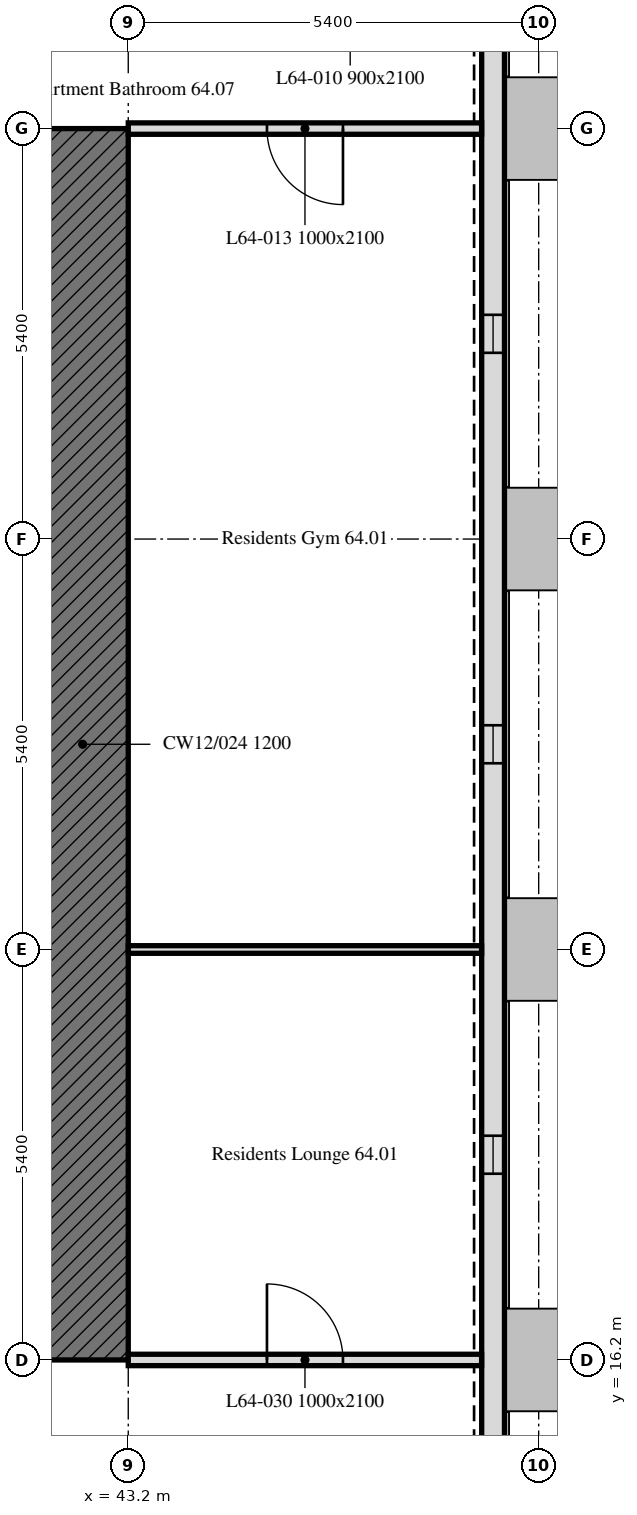
"""IFC4 building model, lengths in metres.
Left out: names, types, materials, properties, quantities, classifications, styles, units other than length and angle.
Written with IfcOpenShell. Run it as: python <this file> out.ifc"""

import sys

from ifc_helpers import new_model, si_unit, direction, frame, frame_2d, origin, place, context, subcontext, project, spatial, rectangle, extrude, element, fill, save


model = new_model("IFC4")
c1 = context("Model", 3, precision=1e-05, world=origin(), true_north=direction((0.0, 1.0)))
c2 = subcontext(c1, "Body", "Model", "MODEL_VIEW")
j1 = project(units=[si_unit("LENGTHUNIT", "METRE"), si_unit("PLANEANGLEUNIT", "RADIAN")], contexts=[c1])
p1 = place(None, origin())
s1 = spatial("IfcSite", under=j1, at=p1, CompositionType="ELEMENT")
p2 = place(p1, origin())
s2 = spatial("IfcBuilding", under=s1, at=p2, CompositionType="ELEMENT")
p3 = place(p2, frame((0.0, 0.0, 265.3)))
s3 = spatial("IfcBuildingStorey", under=s2, at=p3, CompositionType="ELEMENT", Elevation=265.3)
p4 = place(p3, frame((48.0, 5.586, 0.0), z_axis=(0.0, 0.0, 1.0), x_axis=(0.0, 1.0, 0.0)))
e1 = element("IfcWall", 1, at=p4, inside=s3, PredefinedType="SOLIDWALL", context=c2, shape_type="SweptSolid", body=[
    extrude(rectangle(XDim=32.027, YDim=0.3, at=frame_2d((16.014, 0.0))), origin(), (0.0, 0.0, 1.0), 3.0),
])
p5 = place(p4, frame((1.314, 0.0, 0.9)))
e2 = element("IfcOpeningElement", 2, at=p5, cuts=e1, PredefinedType="OPENING", context=c2, shape_type="SweptSolid", body=[
    extrude(rectangle(XDim=1.1, YDim=1.7, at=frame_2d((0.55, 0.85))), frame((0.0, 0.16, 0.0), z_axis=(0.0, -1.0, 0.0), x_axis=(1.0, 0.0, 0.0)), (0.0, 0.0, 1.0), 0.32),
])
p6 = place(p4, frame((2.764, 0.0, 0.9)))
e3 = element("IfcOpeningElement", 3, at=p6, cuts=e1, PredefinedType="OPENING", context=c2, shape_type="SweptSolid", body=[
    extrude(rectangle(XDim=1.1, YDim=1.7, at=frame_2d((0.55, 0.85))), frame((0.0, 0.16, 0.0), z_axis=(0.0, -1.0, 0.0), x_axis=(1.0, 0.0, 0.0)), (0.0, 0.0, 1.0), 0.32),
])
p7 = place(p4, frame((7.664, 0.0, 0.9)))
e4 = element("IfcOpeningElement", 4, at=p7, cuts=e1, PredefinedType="OPENING", context=c2, shape_type="SweptSolid", body=[
    extrude(rectangle(XDim=0.5, YDim=1.7, at=frame_2d((0.25, 0.85))), frame((0.0, 0.16, 0.0), z_axis=(0.0, -1.0, 0.0), x_axis=(1.0, 0.0, 0.0)), (0.0, 0.0, 1.0), 0.32),
])
p8 = place(p4, frame((13.064, 0.0, 0.9)))
e5 = element("IfcOpeningElement", 5, at=p8, cuts=e1, PredefinedType="OPENING", context=c2, shape_type="SweptSolid", body=[
    extrude(rectangle(XDim=0.5, YDim=1.7, at=frame_2d((0.25, 0.85))), frame((0.0, 0.16, 0.0), z_axis=(0.0, -1.0, 0.0), x_axis=(1.0, 0.0, 0.0)), (0.0, 0.0, 1.0), 0.32),
])
p9 = place(p4, frame((18.464, 0.0, 0.9)))
e6 = element("IfcOpeningElement", 6, at=p9, cuts=e1, PredefinedType="OPENING", context=c2, shape_type="SweptSolid", body=[
    extrude(rectangle(XDim=0.5, YDim=1.7, at=frame_2d((0.25, 0.85))), frame((0.0, 0.16, 0.0), z_axis=(0.0, -1.0, 0.0), x_axis=(1.0, 0.0, 0.0)), (0.0, 0.0, 1.0), 0.32),
])
p10 = place(p4, frame((23.864, 0.0, 0.9)))
e7 = element("IfcOpeningElement", 7, at=p10, cuts=e1, PredefinedType="OPENING", context=c2, shape_type="SweptSolid", body=[
    extrude(rectangle(XDim=0.5, YDim=1.7, at=frame_2d((0.25, 0.85))), frame((0.0, 0.16, 0.0), z_axis=(0.0, -1.0, 0.0), x_axis=(1.0, 0.0, 0.0)), (0.0, 0.0, 1.0), 0.32),
])
p11 = place(p4, frame((28.239, 0.0, 0.9)))
e8 = element("IfcOpeningElement", 8, at=p11, cuts=e1, PredefinedType="OPENING", context=c2, shape_type="SweptSolid", body=[
    extrude(rectangle(XDim=0.65, YDim=1.7, at=frame_2d((0.325, 0.85))), frame((0.0, 0.16, 0.0), z_axis=(0.0, -1.0, 0.0), x_axis=(1.0, 0.0, 0.0)), (0.0, 0.0, 1.0), 0.32),
])
p12 = place(p4, frame((29.764, 0.0, 0.9)))
e9 = element("IfcOpeningElement", 9, at=p12, cuts=e1, PredefinedType="OPENING", context=c2, shape_type="SweptSolid", body=[
    extrude(rectangle(XDim=1.1, YDim=1.7, at=frame_2d((0.55, 0.85))), frame((0.0, 0.16, 0.0), z_axis=(0.0, -1.0, 0.0), x_axis=(1.0, 0.0, 0.0)), (0.0, 0.0, 1.0), 0.32),
])
p13 = place(p3, frame((42.6, 32.4, 0.0), z_axis=(0.0, 0.0, 1.0), x_axis=(0.0, -1.0, 0.0)))
e10 = element("IfcWall", 10, at=p13, inside=s3, PredefinedType="SOLIDWALL", context=c2, shape_type="SweptSolid", body=[
    extrude(rectangle(XDim=16.2, YDim=1.2, at=frame_2d((8.1, 0.0))), origin(), (0.0, 0.0, 1.0), 3.0),
])
p14 = place(p3, frame((43.2, 21.6, 0.0), z_axis=(0.0, 0.0, 1.0), x_axis=(1.0, 0.0, 0.0)))
e11 = element("IfcWall", 11, at=p14, inside=s3, PredefinedType="PARTITIONING", context=c2, shape_type="SweptSolid", body=[
    extrude(rectangle(XDim=4.649, YDim=0.1, at=frame_2d((2.325, 0.0))), origin(), (0.0, 0.0, 1.0), 2.4),
])
p15 = place(p3, frame((47.849, 32.4, 0.0), z_axis=(0.0, 0.0, 1.0), x_axis=(-1.0, 0.0, 0.0)))
e12 = element("IfcWall", 12, at=p15, inside=s3, PredefinedType="PARTITIONING", context=c2, shape_type="SweptSolid", body=[
    extrude(rectangle(XDim=4.649, YDim=0.15, at=frame_2d((2.325, 0.0))), origin(), (0.0, 0.0, 1.0), 2.4),
])
p16 = place(p15, frame((1.824, 0.0, 0.0)))
e13 = element("IfcOpeningElement", 13, at=p16, cuts=e12, PredefinedType="OPENING", context=c2, shape_type="SweptSolid", body=[
    extrude(rectangle(XDim=1.0, YDim=2.1, at=frame_2d((0.5, 1.05))), frame((0.0, 0.075, 0.0), z_axis=(0.0, -1.0, 0.0), x_axis=(1.0, 0.0, 0.0)), (0.0, 0.0, 1.0), 0.15),
])
p17 = place(p3, frame((43.2, 16.2, 0.0), z_axis=(0.0, 0.0, 1.0), x_axis=(1.0, 0.0, 0.0)))
e14 = element("IfcWall", 14, at=p17, inside=s3, PredefinedType="PARTITIONING", context=c2, shape_type="SweptSolid", body=[
    extrude(rectangle(XDim=4.649, YDim=0.15, at=frame_2d((2.325, 0.0))), origin(), (0.0, 0.0, 1.0), 2.4),
])
p18 = place(p17, frame((1.825, 0.0, 0.0)))
e15 = element("IfcOpeningElement", 15, at=p18, cuts=e14, PredefinedType="OPENING", context=c2, shape_type="SweptSolid", body=[
    extrude(rectangle(XDim=1.0, YDim=2.1, at=frame_2d((0.5, 1.05))), frame((0.0, 0.075, 0.0), z_axis=(0.0, -1.0, 0.0), x_axis=(1.0, 0.0, 0.0)), (0.0, 0.0, 1.0), 0.15),
])
p19 = place(p8, origin())
e16 = element("IfcWindow", 16, at=p19, inside=s3, PartitioningType="SINGLE_PANEL", PredefinedType="WINDOW", context=c2, shape_type="SweptSolid", body=[
    extrude(rectangle(XDim=0.5, YDim=1.7, at=frame_2d((0.25, 0.85))), frame((0.0, 0.03, 0.0), z_axis=(0.0, -1.0, 0.0), x_axis=(1.0, 0.0, 0.0)), (0.0, 0.0, 1.0), 0.06),
])
fill(e5, e16)
p20 = place(p9, origin())
e17 = element("IfcWindow", 17, at=p20, inside=s3, PartitioningType="SINGLE_PANEL", PredefinedType="WINDOW", context=c2, shape_type="SweptSolid", body=[
    extrude(rectangle(XDim=0.5, YDim=1.7, at=frame_2d((0.25, 0.85))), frame((0.0, 0.03, 0.0), z_axis=(0.0, -1.0, 0.0), x_axis=(1.0, 0.0, 0.0)), (0.0, 0.0, 1.0), 0.06),
])
fill(e6, e17)
p21 = place(p10, origin())
e18 = element("IfcWindow", 18, at=p21, inside=s3, PartitioningType="SINGLE_PANEL", PredefinedType="WINDOW", context=c2, shape_type="SweptSolid", body=[
    extrude(rectangle(XDim=0.5, YDim=1.7, at=frame_2d((0.25, 0.85))), frame((0.0, 0.03, 0.0), z_axis=(0.0, -1.0, 0.0), x_axis=(1.0, 0.0, 0.0)), (0.0, 0.0, 1.0), 0.06),
])
fill(e7, e18)
p22 = place(p16, origin())
e19 = element("IfcDoor", 19, at=p22, inside=s3, OperationType="SINGLE_SWING_LEFT", PredefinedType="DOOR", context=c2, shape_type="SweptSolid", body=[
    extrude(rectangle(XDim=1.0, YDim=2.1, at=frame_2d((0.5, 1.05))), frame((0.0, 0.025, 0.0), z_axis=(0.0, -1.0, 0.0), x_axis=(1.0, 0.0, 0.0)), (0.0, 0.0, 1.0), 0.05),
])
fill(e13, e19)
p23 = place(p18, origin())
e20 = element("IfcDoor", 20, at=p23, inside=s3, OperationType="SINGLE_SWING_LEFT", PredefinedType="DOOR", context=c2, shape_type="SweptSolid", body=[
    extrude(rectangle(XDim=1.0, YDim=2.1, at=frame_2d((0.5, 1.05))), frame((0.0, 0.025, 0.0), z_axis=(0.0, -1.0, 0.0), x_axis=(1.0, 0.0, 0.0)), (0.0, 0.0, 1.0), 0.05),
])
fill(e15, e20)
save(model, sys.argv[1])
